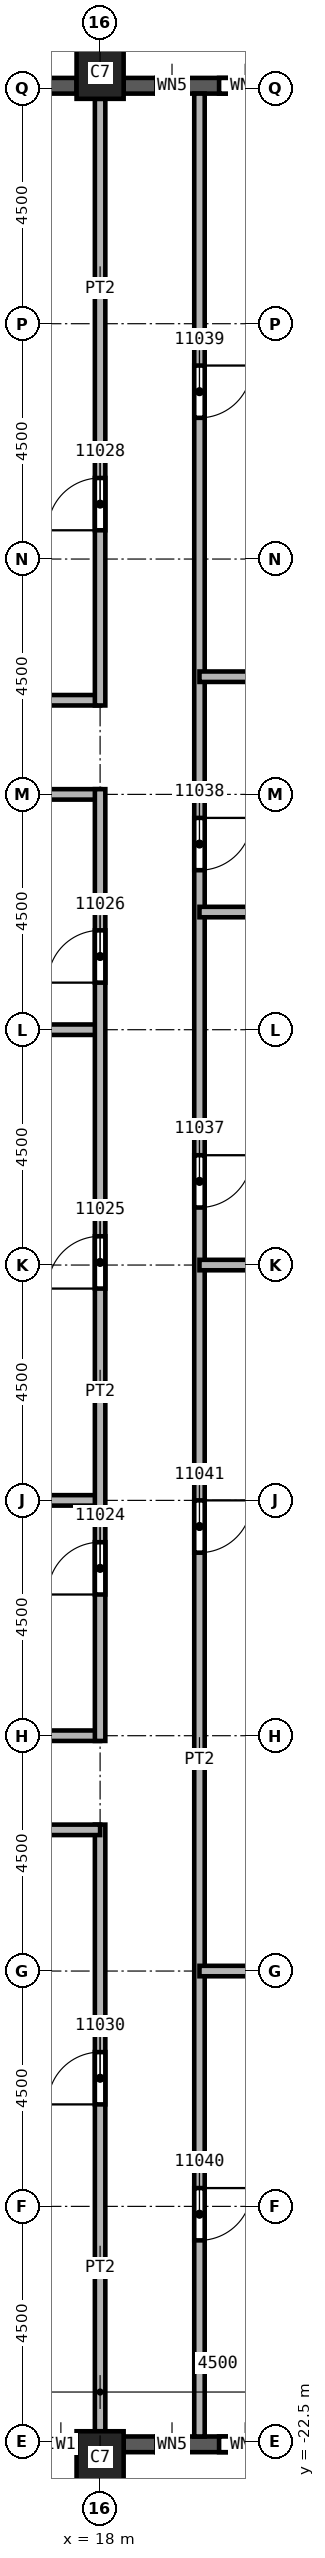
"""IFC4 building model, lengths in metres.
Left out: names, types, materials, properties, quantities, classifications, styles, units other than length and angle.
Written with IfcOpenShell. Run it as: python <this file> out.ifc"""

import sys

from ifc_helpers import new_model, si_unit, direction, frame, frame_2d, origin, origin_2d, place, context, subcontext, project, spatial, rectangle, extrude, element, fill, save


model = new_model("IFC4")
c1 = context("Model", 3, precision=1e-05, world=origin(), true_north=direction((0.0, 1.0)))
c2 = subcontext(c1, "Body", "Model", "MODEL_VIEW")
j1 = project(units=[si_unit("LENGTHUNIT", "METRE"), si_unit("PLANEANGLEUNIT", "RADIAN")], contexts=[c1])
p1 = place(None, origin())
s1 = spatial("IfcSite", under=j1, at=p1, CompositionType="ELEMENT")
p2 = place(p1, origin())
s2 = spatial("IfcBuilding", under=s1, at=p2, CompositionType="ELEMENT")
p3 = place(p2, frame((0.0, 0.0, 188.0)))
s3 = spatial("IfcBuildingStorey", under=s2, at=p3, CompositionType="ELEMENT", Elevation=188.0)
for number, where, z_axis, x_axis in (
    (1, (18.0, 22.8, 0.0), (0.0, 0.0, 1.0), (1.0, 0.0, 0.0)),
    (2, (18.0, -22.8, 0.0), (0.0, 0.0, 1.0), (1.0, 0.0, 0.0)),
):
    element("IfcColumn", number, at=place(p3, frame(where, z_axis=z_axis, x_axis=x_axis)), inside=s3, PredefinedType="COLUMN", context=c2, shape_type="SweptSolid", body=[
        extrude(rectangle(XDim=0.9, YDim=1.0, at=origin_2d()), origin(), (0.0, 0.0, 1.0), 3.72),
    ])
p4 = place(p3, frame((13.95, -22.55, 0.0), z_axis=(0.0, 0.0, 1.0), x_axis=(1.0, 0.0, 0.0)))
e3 = element("IfcWall", 3, at=p4, inside=s3, PredefinedType="SOLIDWALL", context=c2, shape_type="SweptSolid", body=[
    extrude(rectangle(XDim=3.6, YDim=0.3, at=frame_2d((1.8, 0.0))), origin(), (0.0, 0.0, 1.0), 3.12),
])
p5 = place(p4, frame((0.6, 0.0, 0.8)))
e4 = element("IfcOpeningElement", 4, at=p5, cuts=e3, PredefinedType="OPENING", context=c2, shape_type="SweptSolid", body=[
    extrude(rectangle(XDim=2.4, YDim=1.95, at=frame_2d((1.2, 0.975))), frame((0.0, 0.15, 0.0), z_axis=(0.0, -1.0, 0.0), x_axis=(1.0, 0.0, 0.0)), (0.0, 0.0, 1.0), 0.3),
])
p6 = place(p3, frame((18.45, -22.55, 0.0), z_axis=(0.0, 0.0, 1.0), x_axis=(1.0, 0.0, 0.0)))
e5 = element("IfcWall", 5, at=p6, inside=s3, PredefinedType="SOLIDWALL", context=c2, shape_type="SweptSolid", body=[
    extrude(rectangle(XDim=3.6, YDim=0.3, at=frame_2d((1.8, 0.0))), origin(), (0.0, 0.0, 1.0), 3.12),
])
p7 = place(p6, frame((0.625, 0.0, 0.8)))
e6 = element("IfcOpeningElement", 6, at=p7, cuts=e5, PredefinedType="OPENING", context=c2, shape_type="SweptSolid", body=[
    extrude(rectangle(XDim=0.6, YDim=1.95, at=frame_2d((0.3, 0.975))), frame((0.0, 0.15, 0.0), z_axis=(0.0, -1.0, 0.0), x_axis=(1.0, 0.0, 0.0)), (0.0, 0.0, 1.0), 0.3),
])
p8 = place(p6, frame((1.825, 0.0, 0.8)))
e7 = element("IfcOpeningElement", 7, at=p8, cuts=e5, PredefinedType="OPENING", context=c2, shape_type="SweptSolid", body=[
    extrude(rectangle(XDim=1.0, YDim=1.95, at=frame_2d((0.5, 0.975))), frame((0.0, 0.15, 0.0), z_axis=(0.0, -1.0, 0.0), x_axis=(1.0, 0.0, 0.0)), (0.0, 0.0, 1.0), 0.3),
])
p9 = place(p3, frame((22.05, 22.55, 0.0), z_axis=(0.0, 0.0, 1.0), x_axis=(-1.0, 0.0, 0.0)))
e8 = element("IfcWall", 8, at=p9, inside=s3, PredefinedType="SOLIDWALL", context=c2, shape_type="SweptSolid", body=[
    extrude(rectangle(XDim=3.6, YDim=0.3, at=frame_2d((1.8, 0.0))), origin(), (0.0, 0.0, 1.0), 3.12),
])
p10 = place(p9, frame((0.775, 0.0, 0.8)))
e9 = element("IfcOpeningElement", 9, at=p10, cuts=e8, PredefinedType="OPENING", context=c2, shape_type="SweptSolid", body=[
    extrude(rectangle(XDim=1.0, YDim=1.95, at=frame_2d((0.5, 0.975))), frame((0.0, 0.15, 0.0), z_axis=(0.0, -1.0, 0.0), x_axis=(1.0, 0.0, 0.0)), (0.0, 0.0, 1.0), 0.3),
])
p11 = place(p9, frame((2.375, 0.0, 0.8)))
e10 = element("IfcOpeningElement", 10, at=p11, cuts=e8, PredefinedType="OPENING", context=c2, shape_type="SweptSolid", body=[
    extrude(rectangle(XDim=0.6, YDim=1.95, at=frame_2d((0.3, 0.975))), frame((0.0, 0.15, 0.0), z_axis=(0.0, -1.0, 0.0), x_axis=(1.0, 0.0, 0.0)), (0.0, 0.0, 1.0), 0.3),
])
p12 = place(p3, frame((17.55, 22.55, 0.0), z_axis=(0.0, 0.0, 1.0), x_axis=(-1.0, 0.0, 0.0)))
e11 = element("IfcWall", 11, at=p12, inside=s3, PredefinedType="SOLIDWALL", context=c2, shape_type="SweptSolid", body=[
    extrude(rectangle(XDim=3.6, YDim=0.3, at=frame_2d((1.8, 0.0))), origin(), (0.0, 0.0, 1.0), 3.12),
])
p13 = place(p12, frame((0.6, 0.0, 0.8)))
e12 = element("IfcOpeningElement", 12, at=p13, cuts=e11, PredefinedType="OPENING", context=c2, shape_type="SweptSolid", body=[
    extrude(rectangle(XDim=2.4, YDim=1.95, at=frame_2d((1.2, 0.975))), frame((0.0, 0.15, 0.0), z_axis=(0.0, -1.0, 0.0), x_axis=(1.0, 0.0, 0.0)), (0.0, 0.0, 1.0), 0.3),
])
for number, where, z_axis, x_axis in (
    (13, (13.5, -9.0, 0.0), (0.0, 0.0, 1.0), (1.0, 0.0, 0.0)),
    (14, (13.5, -4.5, 0.0), (0.0, 0.0, 1.0), (1.0, 0.0, 0.0)),
    (15, (13.5, 4.5, 0.0), (0.0, 0.0, 1.0), (1.0, 0.0, 0.0)),
    (16, (18.0, 9.0, 0.0), (0.0, 0.0, 1.0), (-1.0, 0.0, 0.0)),
):
    element("IfcWall", number, at=place(p3, frame(where, z_axis=z_axis, x_axis=x_axis)), inside=s3, PredefinedType="PARTITIONING", context=c2, shape_type="SweptSolid", body=[
        extrude(rectangle(XDim=4.5, YDim=0.2, at=frame_2d((2.25, 0.0))), origin(), (0.0, 0.0, 1.0), 3.72),
    ])
p14 = place(p3, frame((14.4, 10.8, 0.0), z_axis=(0.0, 0.0, 1.0), x_axis=(1.0, 0.0, 0.0)))
e17 = element("IfcWall", 17, at=p14, inside=s3, PredefinedType="PARTITIONING", context=c2, shape_type="SweptSolid", body=[
    extrude(rectangle(XDim=3.6, YDim=0.2, at=frame_2d((1.8, 0.0))), origin(), (0.0, 0.0, 1.0), 3.72),
])
p15 = place(p3, frame((18.0, -22.3, 0.0), z_axis=(0.0, 0.0, 1.0), x_axis=(0.0, 1.0, 0.0)))
e18 = element("IfcWall", 18, at=p15, inside=s3, PredefinedType="PARTITIONING", context=c2, shape_type="SweptSolid", body=[
    extrude(rectangle(XDim=11.6, YDim=0.2, at=frame_2d((5.8, 0.0))), origin(), (0.0, 0.0, 1.0), 3.72),
])
p16 = place(p15, frame((6.25, 0.0, 0.0)))
e19 = element("IfcOpeningElement", 19, at=p16, cuts=e18, PredefinedType="OPENING", context=c2, shape_type="SweptSolid", body=[
    extrude(rectangle(XDim=1.0, YDim=2.1, at=frame_2d((0.5, 1.05))), frame((0.0, 0.1, 0.0), z_axis=(0.0, -1.0, 0.0), x_axis=(1.0, 0.0, 0.0)), (0.0, 0.0, 1.0), 0.2),
])
p17 = place(p3, frame((18.0, -10.8, 0.0), z_axis=(0.0, 0.0, 1.0), x_axis=(-1.0, 0.0, 0.0)))
e20 = element("IfcWall", 20, at=p17, inside=s3, PredefinedType="PARTITIONING", context=c2, shape_type="SweptSolid", body=[
    extrude(rectangle(XDim=3.6, YDim=0.2, at=frame_2d((1.8, 0.0))), origin(), (0.0, 0.0, 1.0), 3.72),
])
p18 = place(p3, frame((18.0, -9.1, 0.0), z_axis=(0.0, 0.0, 1.0), x_axis=(0.0, 1.0, 0.0)))
e21 = element("IfcWall", 21, at=p18, inside=s3, PredefinedType="PARTITIONING", context=c2, shape_type="SweptSolid", body=[
    extrude(rectangle(XDim=18.2, YDim=0.2, at=frame_2d((9.1, 0.0))), origin(), (0.0, 0.0, 1.0), 3.72),
])
p19 = place(p18, frame((2.8, 0.0, 0.0)))
e22 = element("IfcOpeningElement", 22, at=p19, cuts=e21, PredefinedType="OPENING", context=c2, shape_type="SweptSolid", body=[
    extrude(rectangle(XDim=1.0, YDim=2.1, at=frame_2d((0.5, 1.05))), frame((0.0, 0.1, 0.0), z_axis=(0.0, -1.0, 0.0), x_axis=(1.0, 0.0, 0.0)), (0.0, 0.0, 1.0), 0.2),
])
p20 = place(p18, frame((8.65, 0.0, 0.0)))
e23 = element("IfcOpeningElement", 23, at=p20, cuts=e21, PredefinedType="OPENING", context=c2, shape_type="SweptSolid", body=[
    extrude(rectangle(XDim=1.0, YDim=2.1, at=frame_2d((0.5, 1.05))), frame((0.0, 0.1, 0.0), z_axis=(0.0, -1.0, 0.0), x_axis=(1.0, 0.0, 0.0)), (0.0, 0.0, 1.0), 0.2),
])
p21 = place(p18, frame((14.5, 0.0, 0.0)))
e24 = element("IfcOpeningElement", 24, at=p21, cuts=e21, PredefinedType="OPENING", context=c2, shape_type="SweptSolid", body=[
    extrude(rectangle(XDim=1.0, YDim=2.1, at=frame_2d((0.5, 1.05))), frame((0.0, 0.1, 0.0), z_axis=(0.0, -1.0, 0.0), x_axis=(1.0, 0.0, 0.0)), (0.0, 0.0, 1.0), 0.2),
])
p22 = place(p3, frame((18.0, 10.7, 0.0), z_axis=(0.0, 0.0, 1.0), x_axis=(0.0, 1.0, 0.0)))
e25 = element("IfcWall", 25, at=p22, inside=s3, PredefinedType="PARTITIONING", context=c2, shape_type="SweptSolid", body=[
    extrude(rectangle(XDim=11.6, YDim=0.2, at=frame_2d((5.8, 0.0))), origin(), (0.0, 0.0, 1.0), 3.72),
])
p23 = place(p22, frame((3.35, 0.0, 0.0)))
e26 = element("IfcOpeningElement", 26, at=p23, cuts=e25, PredefinedType="OPENING", context=c2, shape_type="SweptSolid", body=[
    extrude(rectangle(XDim=1.0, YDim=2.1, at=frame_2d((0.5, 1.05))), frame((0.0, 0.1, 0.0), z_axis=(0.0, -1.0, 0.0), x_axis=(1.0, 0.0, 0.0)), (0.0, 0.0, 1.0), 0.2),
])
p24 = place(p3, frame((19.9, 22.4, 0.0), z_axis=(0.0, 0.0, 1.0), x_axis=(0.0, -1.0, 0.0)))
e27 = element("IfcWall", 27, at=p24, inside=s3, PredefinedType="PARTITIONING", context=c2, shape_type="SweptSolid", body=[
    extrude(rectangle(XDim=44.8, YDim=0.2, at=frame_2d((22.4, 0.0))), origin(), (0.0, 0.0, 1.0), 3.72),
])
p25 = place(p24, frame((20.3, 0.0, 0.0)))
e28 = element("IfcOpeningElement", 28, at=p25, cuts=e27, PredefinedType="OPENING", context=c2, shape_type="SweptSolid", body=[
    extrude(rectangle(XDim=1.0, YDim=2.1, at=frame_2d((0.5, 1.05))), frame((0.0, 0.1, 0.0), z_axis=(0.0, -1.0, 0.0), x_axis=(1.0, 0.0, 0.0)), (0.0, 0.0, 1.0), 0.2),
])
p26 = place(p24, frame((13.85, 0.0, 0.0)))
e29 = element("IfcOpeningElement", 29, at=p26, cuts=e27, PredefinedType="OPENING", context=c2, shape_type="SweptSolid", body=[
    extrude(rectangle(XDim=1.0, YDim=2.1, at=frame_2d((0.5, 1.05))), frame((0.0, 0.1, 0.0), z_axis=(0.0, -1.0, 0.0), x_axis=(1.0, 0.0, 0.0)), (0.0, 0.0, 1.0), 0.2),
])
p27 = place(p24, frame((5.2, 0.0, 0.0)))
e30 = element("IfcOpeningElement", 30, at=p27, cuts=e27, PredefinedType="OPENING", context=c2, shape_type="SweptSolid", body=[
    extrude(rectangle(XDim=1.0, YDim=2.1, at=frame_2d((0.5, 1.05))), frame((0.0, 0.1, 0.0), z_axis=(0.0, -1.0, 0.0), x_axis=(1.0, 0.0, 0.0)), (0.0, 0.0, 1.0), 0.2),
])
p28 = place(p24, frame((40.05, 0.0, 0.0)))
e31 = element("IfcOpeningElement", 31, at=p28, cuts=e27, PredefinedType="OPENING", context=c2, shape_type="SweptSolid", body=[
    extrude(rectangle(XDim=1.0, YDim=2.1, at=frame_2d((0.5, 1.05))), frame((0.0, 0.1, 0.0), z_axis=(0.0, -1.0, 0.0), x_axis=(1.0, 0.0, 0.0)), (0.0, 0.0, 1.0), 0.2),
])
p29 = place(p24, frame((26.9, 0.0, 0.0)))
e32 = element("IfcOpeningElement", 32, at=p29, cuts=e27, PredefinedType="OPENING", context=c2, shape_type="SweptSolid", body=[
    extrude(rectangle(XDim=1.0, YDim=2.1, at=frame_2d((0.5, 1.05))), frame((0.0, 0.1, 0.0), z_axis=(0.0, -1.0, 0.0), x_axis=(1.0, 0.0, 0.0)), (0.0, 0.0, 1.0), 0.2),
])
for number, where, z_axis, x_axis in (
    (33, (19.9, -13.5, 0.0), (0.0, 0.0, 1.0), (1.0, 0.0, 0.0)),
    (34, (19.9, 6.75, 0.0), (0.0, 0.0, 1.0), (1.0, 0.0, 0.0)),
    (35, (19.9, 11.25, 0.0), (0.0, 0.0, 1.0), (1.0, 0.0, 0.0)),
):
    element("IfcWall", number, at=place(p3, frame(where, z_axis=z_axis, x_axis=x_axis)), inside=s3, PredefinedType="PARTITIONING", context=c2, shape_type="SweptSolid", body=[
        extrude(rectangle(XDim=6.7, YDim=0.2, at=frame_2d((3.35, 0.0))), origin(), (0.0, 0.0, 1.0), 3.72),
    ])
p30 = place(p3, frame((26.5, 0.0, 0.0), z_axis=(0.0, 0.0, 1.0), x_axis=(-1.0, 0.0, 0.0)))
e36 = element("IfcWall", 36, at=p30, inside=s3, PredefinedType="PARTITIONING", context=c2, shape_type="SweptSolid", body=[
    extrude(rectangle(XDim=6.6, YDim=0.2, at=frame_2d((3.3, 0.0))), origin(), (0.0, 0.0, 1.0), 3.72),
])
p31 = place(p19, origin())
e37 = element("IfcDoor", 37, at=p31, inside=s3, OperationType="SINGLE_SWING_LEFT", PredefinedType="DOOR", context=c2, shape_type="SweptSolid", body=[
    extrude(rectangle(XDim=1.0, YDim=2.1, at=frame_2d((0.5, 1.05))), frame((0.0, 0.025, 0.0), z_axis=(0.0, -1.0, 0.0), x_axis=(1.0, 0.0, 0.0)), (0.0, 0.0, 1.0), 0.05),
])
fill(e22, e37)
p32 = place(p20, origin())
e38 = element("IfcDoor", 38, at=p32, inside=s3, OperationType="SINGLE_SWING_RIGHT", PredefinedType="DOOR", context=c2, shape_type="SweptSolid", body=[
    extrude(rectangle(XDim=1.0, YDim=2.1, at=frame_2d((0.5, 1.05))), frame((0.0, 0.025, 0.0), z_axis=(0.0, -1.0, 0.0), x_axis=(1.0, 0.0, 0.0)), (0.0, 0.0, 1.0), 0.05),
])
fill(e23, e38)
p33 = place(p21, origin())
e39 = element("IfcDoor", 39, at=p33, inside=s3, OperationType="SINGLE_SWING_LEFT", PredefinedType="DOOR", context=c2, shape_type="SweptSolid", body=[
    extrude(rectangle(XDim=1.0, YDim=2.1, at=frame_2d((0.5, 1.05))), frame((0.0, 0.025, 0.0), z_axis=(0.0, -1.0, 0.0), x_axis=(1.0, 0.0, 0.0)), (0.0, 0.0, 1.0), 0.05),
])
fill(e24, e39)
p34 = place(p23, origin())
e40 = element("IfcDoor", 40, at=p34, inside=s3, OperationType="SINGLE_SWING_LEFT", PredefinedType="DOOR", context=c2, shape_type="SweptSolid", body=[
    extrude(rectangle(XDim=1.0, YDim=2.1, at=frame_2d((0.5, 1.05))), frame((0.0, 0.025, 0.0), z_axis=(0.0, -1.0, 0.0), x_axis=(1.0, 0.0, 0.0)), (0.0, 0.0, 1.0), 0.05),
])
fill(e26, e40)
p35 = place(p16, origin())
e41 = element("IfcDoor", 41, at=p35, inside=s3, OperationType="SINGLE_SWING_LEFT", PredefinedType="DOOR", context=c2, shape_type="SweptSolid", body=[
    extrude(rectangle(XDim=1.0, YDim=2.1, at=frame_2d((0.5, 1.05))), frame((0.0, 0.025, 0.0), z_axis=(0.0, -1.0, 0.0), x_axis=(1.0, 0.0, 0.0)), (0.0, 0.0, 1.0), 0.05),
])
fill(e19, e41)
p36 = place(p25, origin())
e42 = element("IfcDoor", 42, at=p36, inside=s3, OperationType="SINGLE_SWING_RIGHT", PredefinedType="DOOR", context=c2, shape_type="SweptSolid", body=[
    extrude(rectangle(XDim=1.0, YDim=2.1, at=frame_2d((0.5, 1.05))), frame((0.0, 0.025, 0.0), z_axis=(0.0, -1.0, 0.0), x_axis=(1.0, 0.0, 0.0)), (0.0, 0.0, 1.0), 0.05),
])
fill(e28, e42)
p37 = place(p26, origin())
e43 = element("IfcDoor", 43, at=p37, inside=s3, OperationType="SINGLE_SWING_LEFT", PredefinedType="DOOR", context=c2, shape_type="SweptSolid", body=[
    extrude(rectangle(XDim=1.0, YDim=2.1, at=frame_2d((0.5, 1.05))), frame((0.0, 0.025, 0.0), z_axis=(0.0, -1.0, 0.0), x_axis=(1.0, 0.0, 0.0)), (0.0, 0.0, 1.0), 0.05),
])
fill(e29, e43)
p38 = place(p27, origin())
e44 = element("IfcDoor", 44, at=p38, inside=s3, OperationType="SINGLE_SWING_RIGHT", PredefinedType="DOOR", context=c2, shape_type="SweptSolid", body=[
    extrude(rectangle(XDim=1.0, YDim=2.1, at=frame_2d((0.5, 1.05))), frame((0.0, 0.025, 0.0), z_axis=(0.0, -1.0, 0.0), x_axis=(1.0, 0.0, 0.0)), (0.0, 0.0, 1.0), 0.05),
])
fill(e30, e44)
p39 = place(p28, origin())
e45 = element("IfcDoor", 45, at=p39, inside=s3, OperationType="SINGLE_SWING_LEFT", PredefinedType="DOOR", context=c2, shape_type="SweptSolid", body=[
    extrude(rectangle(XDim=1.0, YDim=2.1, at=frame_2d((0.5, 1.05))), frame((0.0, 0.025, 0.0), z_axis=(0.0, -1.0, 0.0), x_axis=(1.0, 0.0, 0.0)), (0.0, 0.0, 1.0), 0.05),
])
fill(e31, e45)
p40 = place(p29, origin())
e46 = element("IfcDoor", 46, at=p40, inside=s3, OperationType="SINGLE_SWING_RIGHT", PredefinedType="DOOR", context=c2, shape_type="SweptSolid", body=[
    extrude(rectangle(XDim=1.0, YDim=2.1, at=frame_2d((0.5, 1.05))), frame((0.0, 0.025, 0.0), z_axis=(0.0, -1.0, 0.0), x_axis=(1.0, 0.0, 0.0)), (0.0, 0.0, 1.0), 0.05),
])
fill(e32, e46)
p41 = place(p7, origin())
e47 = element("IfcWindow", 47, at=p41, inside=s3, PartitioningType="SINGLE_PANEL", PredefinedType="WINDOW", context=c2, shape_type="SweptSolid", body=[
    extrude(rectangle(XDim=0.6, YDim=1.95, at=frame_2d((0.3, 0.975))), frame((0.0, 0.03, 0.0), z_axis=(0.0, -1.0, 0.0), x_axis=(1.0, 0.0, 0.0)), (0.0, 0.0, 1.0), 0.06),
])
fill(e6, e47)
p42 = place(p8, origin())
e48 = element("IfcWindow", 48, at=p42, inside=s3, PartitioningType="SINGLE_PANEL", PredefinedType="WINDOW", context=c2, shape_type="SweptSolid", body=[
    extrude(rectangle(XDim=1.0, YDim=1.95, at=frame_2d((0.5, 0.975))), frame((0.0, 0.03, 0.0), z_axis=(0.0, -1.0, 0.0), x_axis=(1.0, 0.0, 0.0)), (0.0, 0.0, 1.0), 0.06),
])
fill(e7, e48)
p43 = place(p10, origin())
e49 = element("IfcWindow", 49, at=p43, inside=s3, PartitioningType="SINGLE_PANEL", PredefinedType="WINDOW", context=c2, shape_type="SweptSolid", body=[
    extrude(rectangle(XDim=1.0, YDim=1.95, at=frame_2d((0.5, 0.975))), frame((0.0, 0.03, 0.0), z_axis=(0.0, -1.0, 0.0), x_axis=(1.0, 0.0, 0.0)), (0.0, 0.0, 1.0), 0.06),
])
fill(e9, e49)
p44 = place(p11, origin())
e50 = element("IfcWindow", 50, at=p44, inside=s3, PartitioningType="SINGLE_PANEL", PredefinedType="WINDOW", context=c2, shape_type="SweptSolid", body=[
    extrude(rectangle(XDim=0.6, YDim=1.95, at=frame_2d((0.3, 0.975))), frame((0.0, 0.03, 0.0), z_axis=(0.0, -1.0, 0.0), x_axis=(1.0, 0.0, 0.0)), (0.0, 0.0, 1.0), 0.06),
])
fill(e10, e50)
save(model, sys.argv[1])
